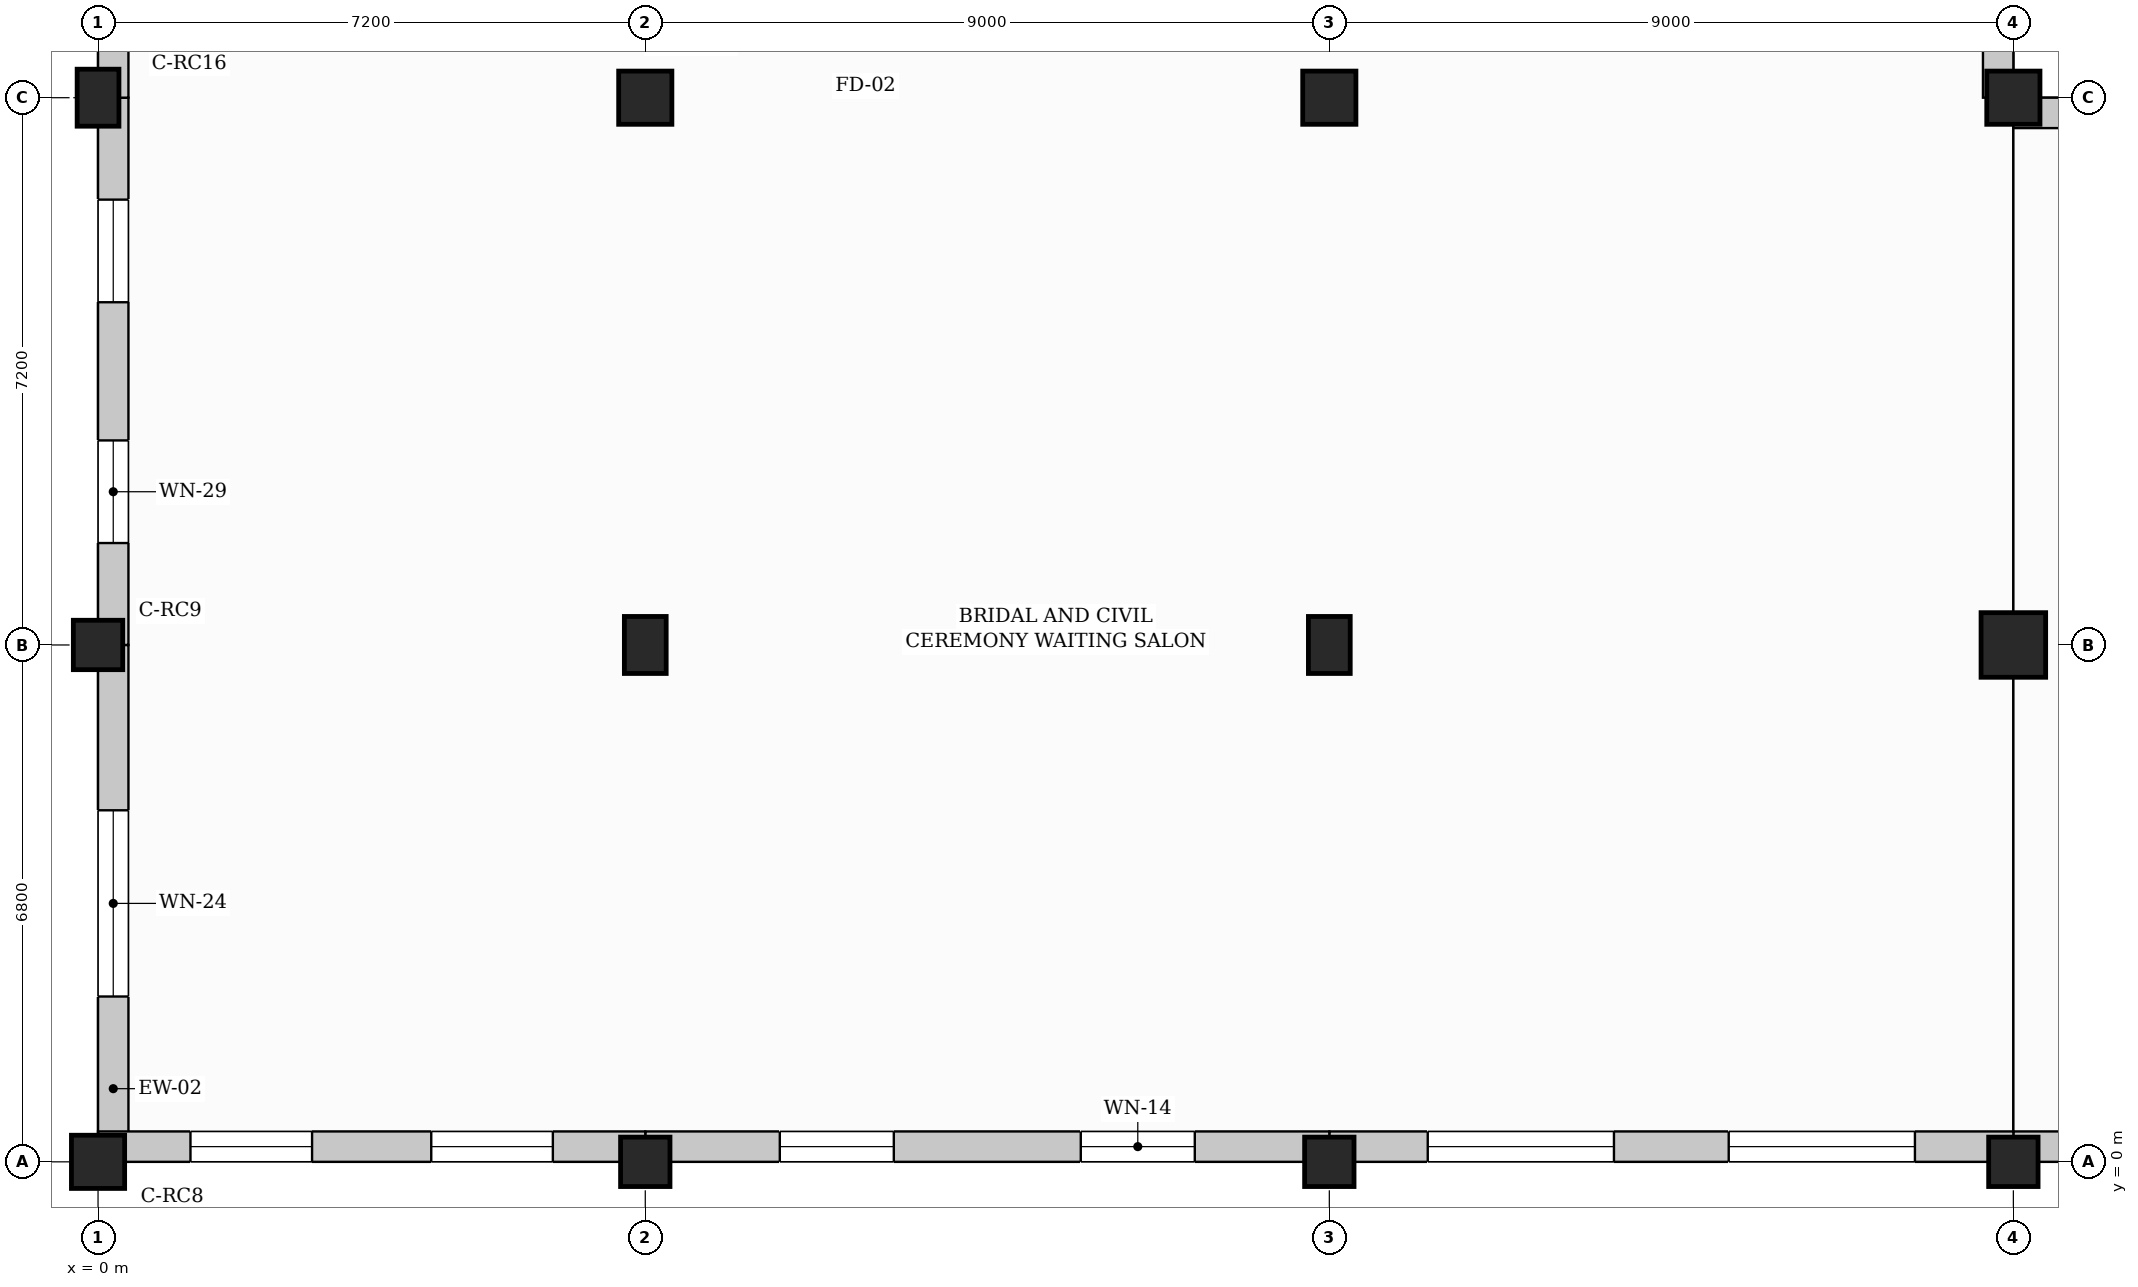
"""IFC4 building model, lengths in metres.
Left out: names, types, materials, properties, quantities, classifications, styles, units other than length and angle.
Written with IfcOpenShell. Run it as: python <this file> out.ifc"""

import sys

from ifc_helpers import new_model, si_unit, direction, frame, frame_2d, origin, origin_with_axes, origin_2d, place, context, subcontext, project, spatial, rectangle, extrude, element, fill, save


model = new_model("IFC4")
c1 = context("Model", 3, precision=1e-05, world=origin(), true_north=direction((0.0, 1.0)))
c2 = subcontext(c1, "Body", "Model", "MODEL_VIEW")
j1 = project(units=[si_unit("LENGTHUNIT", "METRE"), si_unit("PLANEANGLEUNIT", "RADIAN")], contexts=[c1])
p1 = place(None, origin())
s1 = spatial("IfcSite", under=j1, at=p1, CompositionType="ELEMENT")
p2 = place(p1, origin())
s2 = spatial("IfcBuilding", under=s1, at=p2, CompositionType="ELEMENT")
p3 = place(p2, frame((0.0, 0.0, 5.1)))
s3 = spatial("IfcBuildingStorey", under=s2, at=p3, CompositionType="ELEMENT", Elevation=5.1)
p4 = place(p3, origin_with_axes())
e1 = element("IfcColumn", 1, at=p4, inside=s3, PredefinedType="COLUMN", context=c2, shape_type="SweptSolid", body=[
    extrude(rectangle(XDim=0.7, YDim=0.7, at=origin_2d()), origin(), (0.0, 0.0, 1.0), 4.5),
])
p5 = place(p3, frame((0.0, 6.8, 0.0), z_axis=(0.0, 0.0, 1.0), x_axis=(1.0, 0.0, 0.0)))
e2 = element("IfcColumn", 2, at=p5, inside=s3, PredefinedType="COLUMN", context=c2, shape_type="SweptSolid", body=[
    extrude(rectangle(XDim=0.65, YDim=0.65, at=origin_2d()), origin(), (0.0, 0.0, 1.0), 4.5),
])
p6 = place(p3, frame((0.0, 14.0, 0.0), z_axis=(0.0, 0.0, 1.0), x_axis=(1.0, 0.0, 0.0)))
e3 = element("IfcColumn", 3, at=p6, inside=s3, PredefinedType="COLUMN", context=c2, shape_type="SweptSolid", body=[
    extrude(rectangle(XDim=0.55, YDim=0.75, at=origin_2d()), origin(), (0.0, 0.0, 1.0), 4.5),
])
p7 = place(p3, frame((7.2, 0.0, 0.0), z_axis=(0.0, 0.0, 1.0), x_axis=(1.0, 0.0, 0.0)))
e4 = element("IfcColumn", 4, at=p7, inside=s3, PredefinedType="COLUMN", context=c2, shape_type="SweptSolid", body=[
    extrude(rectangle(XDim=0.65, YDim=0.65, at=origin_2d()), origin(), (0.0, 0.0, 1.0), 4.5),
])
p8 = place(p3, frame((7.2, 6.8, 0.0), z_axis=(0.0, 0.0, 1.0), x_axis=(1.0, 0.0, 0.0)))
e5 = element("IfcColumn", 5, at=p8, inside=s3, PredefinedType="COLUMN", context=c2, shape_type="SweptSolid", body=[
    extrude(rectangle(XDim=0.55, YDim=0.75, at=origin_2d()), origin(), (0.0, 0.0, 1.0), 4.5),
])
p9 = place(p3, frame((7.2, 14.0, 0.0), z_axis=(0.0, 0.0, 1.0), x_axis=(1.0, 0.0, 0.0)))
e6 = element("IfcColumn", 6, at=p9, inside=s3, PredefinedType="COLUMN", context=c2, shape_type="SweptSolid", body=[
    extrude(rectangle(XDim=0.7, YDim=0.7, at=origin_2d()), origin(), (0.0, 0.0, 1.0), 4.5),
])
p10 = place(p3, frame((16.2, 0.0, 0.0), z_axis=(0.0, 0.0, 1.0), x_axis=(1.0, 0.0, 0.0)))
e7 = element("IfcColumn", 7, at=p10, inside=s3, PredefinedType="COLUMN", context=c2, shape_type="SweptSolid", body=[
    extrude(rectangle(XDim=0.65, YDim=0.65, at=origin_2d()), origin(), (0.0, 0.0, 1.0), 4.5),
])
p11 = place(p3, frame((16.2, 6.8, 0.0), z_axis=(0.0, 0.0, 1.0), x_axis=(1.0, 0.0, 0.0)))
e8 = element("IfcColumn", 8, at=p11, inside=s3, PredefinedType="COLUMN", context=c2, shape_type="SweptSolid", body=[
    extrude(rectangle(XDim=0.55, YDim=0.75, at=origin_2d()), origin(), (0.0, 0.0, 1.0), 4.5),
])
p12 = place(p3, frame((16.2, 14.0, 0.0), z_axis=(0.0, 0.0, 1.0), x_axis=(1.0, 0.0, 0.0)))
e9 = element("IfcColumn", 9, at=p12, inside=s3, PredefinedType="COLUMN", context=c2, shape_type="SweptSolid", body=[
    extrude(rectangle(XDim=0.7, YDim=0.7, at=origin_2d()), origin(), (0.0, 0.0, 1.0), 4.5),
])
p13 = place(p3, frame((25.2, 0.0, 0.0), z_axis=(0.0, 0.0, 1.0), x_axis=(1.0, 0.0, 0.0)))
e10 = element("IfcColumn", 10, at=p13, inside=s3, PredefinedType="COLUMN", context=c2, shape_type="SweptSolid", body=[
    extrude(rectangle(XDim=0.65, YDim=0.65, at=origin_2d()), origin(), (0.0, 0.0, 1.0), 4.5),
])
p14 = place(p3, frame((25.2, 6.8, 0.0), z_axis=(0.0, 0.0, 1.0), x_axis=(1.0, 0.0, 0.0)))
e11 = element("IfcColumn", 11, at=p14, inside=s3, PredefinedType="COLUMN", context=c2, shape_type="SweptSolid", body=[
    extrude(rectangle(XDim=0.85, YDim=0.85, at=origin_2d()), origin(), (0.0, 0.0, 1.0), 4.5),
])
p15 = place(p3, frame((25.2, 14.0, 0.0), z_axis=(0.0, 0.0, 1.0), x_axis=(1.0, 0.0, 0.0)))
e12 = element("IfcColumn", 12, at=p15, inside=s3, PredefinedType="COLUMN", context=c2, shape_type="SweptSolid", body=[
    extrude(rectangle(XDim=0.7, YDim=0.7, at=origin_2d()), origin(), (0.0, 0.0, 1.0), 4.5),
])
p16 = place(p3, frame((0.2, 0.0, 0.0), z_axis=(0.0, 0.0, 1.0), x_axis=(0.0, 1.0, 0.0)))
e13 = element("IfcWall", 13, at=p16, inside=s3, PredefinedType="SOLIDWALL", context=c2, shape_type="SweptSolid", body=[
    extrude(rectangle(XDim=6.8, YDim=0.4, at=frame_2d((3.4, 0.0))), origin(), (0.0, 0.0, 1.0), 3.6),
])
p17 = place(p16, frame((2.175, 0.0, 0.85)))
e14 = element("IfcOpeningElement", 14, at=p17, cuts=e13, PredefinedType="OPENING", context=c2, shape_type="SweptSolid", body=[
    extrude(rectangle(XDim=2.45, YDim=2.05, at=frame_2d((1.225, 1.025))), frame((0.0, 0.21, 0.0), z_axis=(0.0, -1.0, 0.0), x_axis=(1.0, 0.0, 0.0)), (0.0, 0.0, 1.0), 0.42),
])
p18 = place(p3, frame((0.2, 6.8, 0.0), z_axis=(0.0, 0.0, 1.0), x_axis=(0.0, 1.0, 0.0)))
e15 = element("IfcWall", 15, at=p18, inside=s3, PredefinedType="SOLIDWALL", context=c2, shape_type="SweptSolid", body=[
    extrude(rectangle(XDim=7.2, YDim=0.4, at=frame_2d((3.6, 0.0))), origin(), (0.0, 0.0, 1.0), 3.5),
])
p19 = place(p18, frame((1.341, 0.0, 0.85)))
e16 = element("IfcOpeningElement", 16, at=p19, cuts=e15, PredefinedType="OPENING", context=c2, shape_type="SweptSolid", body=[
    extrude(rectangle(XDim=1.35, YDim=2.35, at=frame_2d((0.675, 1.175))), frame((0.0, 0.21, 0.0), z_axis=(0.0, -1.0, 0.0), x_axis=(1.0, 0.0, 0.0)), (0.0, 0.0, 1.0), 0.42),
])
p20 = place(p18, frame((4.509, 0.0, 0.85)))
e17 = element("IfcOpeningElement", 17, at=p20, cuts=e15, PredefinedType="OPENING", context=c2, shape_type="SweptSolid", body=[
    extrude(rectangle(XDim=1.35, YDim=2.35, at=frame_2d((0.675, 1.175))), frame((0.0, 0.21, 0.0), z_axis=(0.0, -1.0, 0.0), x_axis=(1.0, 0.0, 0.0)), (0.0, 0.0, 1.0), 0.42),
])
p21 = place(p3, frame((0.2, 14.0, 0.0), z_axis=(0.0, 0.0, 1.0), x_axis=(0.0, 1.0, 0.0)))
e18 = element("IfcWall", 18, at=p21, inside=s3, PredefinedType="SOLIDWALL", context=c2, shape_type="SweptSolid", body=[
    extrude(rectangle(XDim=9.0, YDim=0.4, at=frame_2d((4.5, 0.0))), origin(), (0.0, 0.0, 1.0), 3.5),
])
p22 = place(p21, frame((1.72, 0.0, 0.85)))
e19 = element("IfcOpeningElement", 19, at=p22, cuts=e18, PredefinedType="OPENING", context=c2, shape_type="SweptSolid", body=[
    extrude(rectangle(XDim=1.6, YDim=2.4, at=frame_2d((0.8, 1.2))), frame((0.0, 0.21, 0.0), z_axis=(0.0, -1.0, 0.0), x_axis=(1.0, 0.0, 0.0)), (0.0, 0.0, 1.0), 0.42),
])
p23 = place(p21, frame((5.68, 0.0, 0.85)))
e20 = element("IfcOpeningElement", 20, at=p23, cuts=e18, PredefinedType="OPENING", context=c2, shape_type="SweptSolid", body=[
    extrude(rectangle(XDim=1.6, YDim=2.4, at=frame_2d((0.8, 1.2))), frame((0.0, 0.21, 0.0), z_axis=(0.0, -1.0, 0.0), x_axis=(1.0, 0.0, 0.0)), (0.0, 0.0, 1.0), 0.42),
])
p24 = place(p3, frame((25.0, 23.0, 0.0), z_axis=(0.0, 0.0, 1.0), x_axis=(0.0, -1.0, 0.0)))
e21 = element("IfcWall", 21, at=p24, inside=s3, PredefinedType="SOLIDWALL", context=c2, shape_type="SweptSolid", body=[
    extrude(rectangle(XDim=9.0, YDim=0.4, at=frame_2d((4.5, 0.0))), origin(), (0.0, 0.0, 1.0), 3.72),
])
p25 = place(p24, frame((1.42, 0.0, 0.85)))
e22 = element("IfcOpeningElement", 22, at=p25, cuts=e21, PredefinedType="OPENING", context=c2, shape_type="SweptSolid", body=[
    extrude(rectangle(XDim=2.2, YDim=2.4, at=frame_2d((1.1, 1.2))), frame((0.0, 0.21, 0.0), z_axis=(0.0, -1.0, 0.0), x_axis=(1.0, 0.0, 0.0)), (0.0, 0.0, 1.0), 0.42),
])
p26 = place(p24, frame((5.38, 0.0, 0.85)))
e23 = element("IfcOpeningElement", 23, at=p26, cuts=e21, PredefinedType="OPENING", context=c2, shape_type="SweptSolid", body=[
    extrude(rectangle(XDim=2.2, YDim=2.4, at=frame_2d((1.1, 1.2))), frame((0.0, 0.21, 0.0), z_axis=(0.0, -1.0, 0.0), x_axis=(1.0, 0.0, 0.0)), (0.0, 0.0, 1.0), 0.42),
])
p27 = place(p3, frame((25.2, 13.8, 0.0), z_axis=(0.0, 0.0, 1.0), x_axis=(1.0, 0.0, 0.0)))
e24 = element("IfcWall", 24, at=p27, inside=s3, PredefinedType="SOLIDWALL", context=c2, shape_type="SweptSolid", body=[
    extrude(rectangle(XDim=7.2, YDim=0.4, at=frame_2d((3.6, 0.0))), origin(), (0.0, 0.0, 1.0), 3.47),
])
p28 = place(p27, frame((2.375, 0.0, 0.85)))
e25 = element("IfcOpeningElement", 25, at=p28, cuts=e24, PredefinedType="OPENING", context=c2, shape_type="SweptSolid", body=[
    extrude(rectangle(XDim=2.45, YDim=2.05, at=frame_2d((1.225, 1.025))), frame((0.0, 0.21, 0.0), z_axis=(0.0, -1.0, 0.0), x_axis=(1.0, 0.0, 0.0)), (0.0, 0.0, 1.0), 0.42),
])
p29 = place(p3, frame((32.4, 0.2, 0.0), z_axis=(0.0, 0.0, 1.0), x_axis=(-1.0, 0.0, 0.0)))
e26 = element("IfcWall", 26, at=p29, inside=s3, PredefinedType="SOLIDWALL", context=c2, shape_type="SweptSolid", body=[
    extrude(rectangle(XDim=7.2, YDim=0.4, at=frame_2d((3.6, 0.0))), origin(), (0.0, 0.0, 1.0), 3.5),
])
p30 = place(p29, frame((0.916, 0.0, 0.85)))
e27 = element("IfcOpeningElement", 27, at=p30, cuts=e26, PredefinedType="OPENING", context=c2, shape_type="SweptSolid", body=[
    extrude(rectangle(XDim=2.2, YDim=2.4, at=frame_2d((1.1, 1.2))), frame((0.0, 0.21, 0.0), z_axis=(0.0, -1.0, 0.0), x_axis=(1.0, 0.0, 0.0)), (0.0, 0.0, 1.0), 0.42),
])
p31 = place(p29, frame((4.084, 0.0, 0.85)))
e28 = element("IfcOpeningElement", 28, at=p31, cuts=e26, PredefinedType="OPENING", context=c2, shape_type="SweptSolid", body=[
    extrude(rectangle(XDim=2.2, YDim=2.4, at=frame_2d((1.1, 1.2))), frame((0.0, 0.21, 0.0), z_axis=(0.0, -1.0, 0.0), x_axis=(1.0, 0.0, 0.0)), (0.0, 0.0, 1.0), 0.42),
])
p32 = place(p3, frame((25.2, 0.2, 0.0), z_axis=(0.0, 0.0, 1.0), x_axis=(-1.0, 0.0, 0.0)))
e29 = element("IfcWall", 29, at=p32, inside=s3, PredefinedType="SOLIDWALL", context=c2, shape_type="SweptSolid", body=[
    extrude(rectangle(XDim=9.0, YDim=0.4, at=frame_2d((4.5, 0.0))), origin(), (0.0, 0.0, 1.0), 3.32),
])
p33 = place(p32, frame((1.295, 0.0, 0.85)))
e30 = element("IfcOpeningElement", 30, at=p33, cuts=e29, PredefinedType="OPENING", context=c2, shape_type="SweptSolid", body=[
    extrude(rectangle(XDim=2.45, YDim=2.05, at=frame_2d((1.225, 1.025))), frame((0.0, 0.21, 0.0), z_axis=(0.0, -1.0, 0.0), x_axis=(1.0, 0.0, 0.0)), (0.0, 0.0, 1.0), 0.42),
])
p34 = place(p32, frame((5.255, 0.0, 0.85)))
e31 = element("IfcOpeningElement", 31, at=p34, cuts=e29, PredefinedType="OPENING", context=c2, shape_type="SweptSolid", body=[
    extrude(rectangle(XDim=2.45, YDim=2.05, at=frame_2d((1.225, 1.025))), frame((0.0, 0.21, 0.0), z_axis=(0.0, -1.0, 0.0), x_axis=(1.0, 0.0, 0.0)), (0.0, 0.0, 1.0), 0.42),
])
p35 = place(p3, frame((16.2, 0.2, 0.0), z_axis=(0.0, 0.0, 1.0), x_axis=(-1.0, 0.0, 0.0)))
e32 = element("IfcWall", 32, at=p35, inside=s3, PredefinedType="SOLIDWALL", context=c2, shape_type="SweptSolid", body=[
    extrude(rectangle(XDim=9.0, YDim=0.4, at=frame_2d((4.5, 0.0))), origin(), (0.0, 0.0, 1.0), 3.32),
])
p36 = place(p35, frame((1.77, 0.0, 0.75)))
e33 = element("IfcOpeningElement", 33, at=p36, cuts=e32, PredefinedType="OPENING", context=c2, shape_type="SweptSolid", body=[
    extrude(rectangle(XDim=1.5, YDim=1.6, at=frame_2d((0.75, 0.8))), frame((0.0, 0.21, 0.0), z_axis=(0.0, -1.0, 0.0), x_axis=(1.0, 0.0, 0.0)), (0.0, 0.0, 1.0), 0.42),
])
p37 = place(p35, frame((5.73, 0.0, 0.75)))
e34 = element("IfcOpeningElement", 34, at=p37, cuts=e32, PredefinedType="OPENING", context=c2, shape_type="SweptSolid", body=[
    extrude(rectangle(XDim=1.5, YDim=1.6, at=frame_2d((0.75, 0.8))), frame((0.0, 0.21, 0.0), z_axis=(0.0, -1.0, 0.0), x_axis=(1.0, 0.0, 0.0)), (0.0, 0.0, 1.0), 0.42),
])
p38 = place(p3, frame((7.2, 0.2, 0.0), z_axis=(0.0, 0.0, 1.0), x_axis=(-1.0, 0.0, 0.0)))
e35 = element("IfcWall", 35, at=p38, inside=s3, PredefinedType="SOLIDWALL", context=c2, shape_type="SweptSolid", body=[
    extrude(rectangle(XDim=7.2, YDim=0.4, at=frame_2d((3.6, 0.0))), origin(), (0.0, 0.0, 1.0), 3.6),
])
p39 = place(p38, frame((1.216, 0.0, 0.85)))
e36 = element("IfcOpeningElement", 36, at=p39, cuts=e35, PredefinedType="OPENING", context=c2, shape_type="SweptSolid", body=[
    extrude(rectangle(XDim=1.6, YDim=2.4, at=frame_2d((0.8, 1.2))), frame((0.0, 0.21, 0.0), z_axis=(0.0, -1.0, 0.0), x_axis=(1.0, 0.0, 0.0)), (0.0, 0.0, 1.0), 0.42),
])
p40 = place(p38, frame((4.384, 0.0, 0.85)))
e37 = element("IfcOpeningElement", 37, at=p40, cuts=e35, PredefinedType="OPENING", context=c2, shape_type="SweptSolid", body=[
    extrude(rectangle(XDim=1.6, YDim=2.4, at=frame_2d((0.8, 1.2))), frame((0.0, 0.21, 0.0), z_axis=(0.0, -1.0, 0.0), x_axis=(1.0, 0.0, 0.0)), (0.0, 0.0, 1.0), 0.42),
])
p41 = place(p17, origin())
e38 = element("IfcWindow", 38, at=p41, inside=s3, PartitioningType="TRIPLE_PANEL_VERTICAL", PredefinedType="WINDOW", context=c2, shape_type="SweptSolid", body=[
    extrude(rectangle(XDim=2.45, YDim=2.05, at=frame_2d((1.225, 1.025))), frame((0.0, 0.03, 0.0), z_axis=(0.0, -1.0, 0.0), x_axis=(1.0, 0.0, 0.0)), (0.0, 0.0, 1.0), 0.06),
])
fill(e14, e38)
p42 = place(p19, origin())
e39 = element("IfcWindow", 39, at=p42, inside=s3, PartitioningType="SINGLE_PANEL", PredefinedType="WINDOW", context=c2, shape_type="SweptSolid", body=[
    extrude(rectangle(XDim=1.35, YDim=2.35, at=frame_2d((0.675, 1.175))), frame((0.0, 0.03, 0.0), z_axis=(0.0, -1.0, 0.0), x_axis=(1.0, 0.0, 0.0)), (0.0, 0.0, 1.0), 0.06),
])
fill(e16, e39)
p43 = place(p20, origin())
e40 = element("IfcWindow", 40, at=p43, inside=s3, PartitioningType="SINGLE_PANEL", PredefinedType="WINDOW", context=c2, shape_type="SweptSolid", body=[
    extrude(rectangle(XDim=1.35, YDim=2.35, at=frame_2d((0.675, 1.175))), frame((0.0, 0.03, 0.0), z_axis=(0.0, -1.0, 0.0), x_axis=(1.0, 0.0, 0.0)), (0.0, 0.0, 1.0), 0.06),
])
fill(e17, e40)
p44 = place(p33, origin())
e41 = element("IfcWindow", 41, at=p44, inside=s3, PartitioningType="TRIPLE_PANEL_VERTICAL", PredefinedType="WINDOW", context=c2, shape_type="SweptSolid", body=[
    extrude(rectangle(XDim=2.45, YDim=2.05, at=frame_2d((1.225, 1.025))), frame((0.0, 0.03, 0.0), z_axis=(0.0, -1.0, 0.0), x_axis=(1.0, 0.0, 0.0)), (0.0, 0.0, 1.0), 0.06),
])
fill(e30, e41)
p45 = place(p34, origin())
e42 = element("IfcWindow", 42, at=p45, inside=s3, PartitioningType="TRIPLE_PANEL_VERTICAL", PredefinedType="WINDOW", context=c2, shape_type="SweptSolid", body=[
    extrude(rectangle(XDim=2.45, YDim=2.05, at=frame_2d((1.225, 1.025))), frame((0.0, 0.03, 0.0), z_axis=(0.0, -1.0, 0.0), x_axis=(1.0, 0.0, 0.0)), (0.0, 0.0, 1.0), 0.06),
])
fill(e31, e42)
p46 = place(p36, origin())
e43 = element("IfcWindow", 43, at=p46, inside=s3, PartitioningType="DOUBLE_PANEL_HORIZONTAL", PredefinedType="WINDOW", context=c2, shape_type="SweptSolid", body=[
    extrude(rectangle(XDim=1.5, YDim=1.6, at=frame_2d((0.75, 0.8))), frame((0.0, 0.03, 0.0), z_axis=(0.0, -1.0, 0.0), x_axis=(1.0, 0.0, 0.0)), (0.0, 0.0, 1.0), 0.06),
])
fill(e33, e43)
p47 = place(p37, origin())
e44 = element("IfcWindow", 44, at=p47, inside=s3, PartitioningType="DOUBLE_PANEL_HORIZONTAL", PredefinedType="WINDOW", context=c2, shape_type="SweptSolid", body=[
    extrude(rectangle(XDim=1.5, YDim=1.6, at=frame_2d((0.75, 0.8))), frame((0.0, 0.03, 0.0), z_axis=(0.0, -1.0, 0.0), x_axis=(1.0, 0.0, 0.0)), (0.0, 0.0, 1.0), 0.06),
])
fill(e34, e44)
p48 = place(p39, origin())
e45 = element("IfcWindow", 45, at=p48, inside=s3, PartitioningType="DOUBLE_PANEL_VERTICAL", PredefinedType="WINDOW", context=c2, shape_type="SweptSolid", body=[
    extrude(rectangle(XDim=1.6, YDim=2.4, at=frame_2d((0.8, 1.2))), frame((0.0, 0.03, 0.0), z_axis=(0.0, -1.0, 0.0), x_axis=(1.0, 0.0, 0.0)), (0.0, 0.0, 1.0), 0.06),
])
fill(e36, e45)
p49 = place(p40, origin())
e46 = element("IfcWindow", 46, at=p49, inside=s3, PartitioningType="DOUBLE_PANEL_VERTICAL", PredefinedType="WINDOW", context=c2, shape_type="SweptSolid", body=[
    extrude(rectangle(XDim=1.6, YDim=2.4, at=frame_2d((0.8, 1.2))), frame((0.0, 0.03, 0.0), z_axis=(0.0, -1.0, 0.0), x_axis=(1.0, 0.0, 0.0)), (0.0, 0.0, 1.0), 0.06),
])
fill(e37, e46)
save(model, sys.argv[1])
